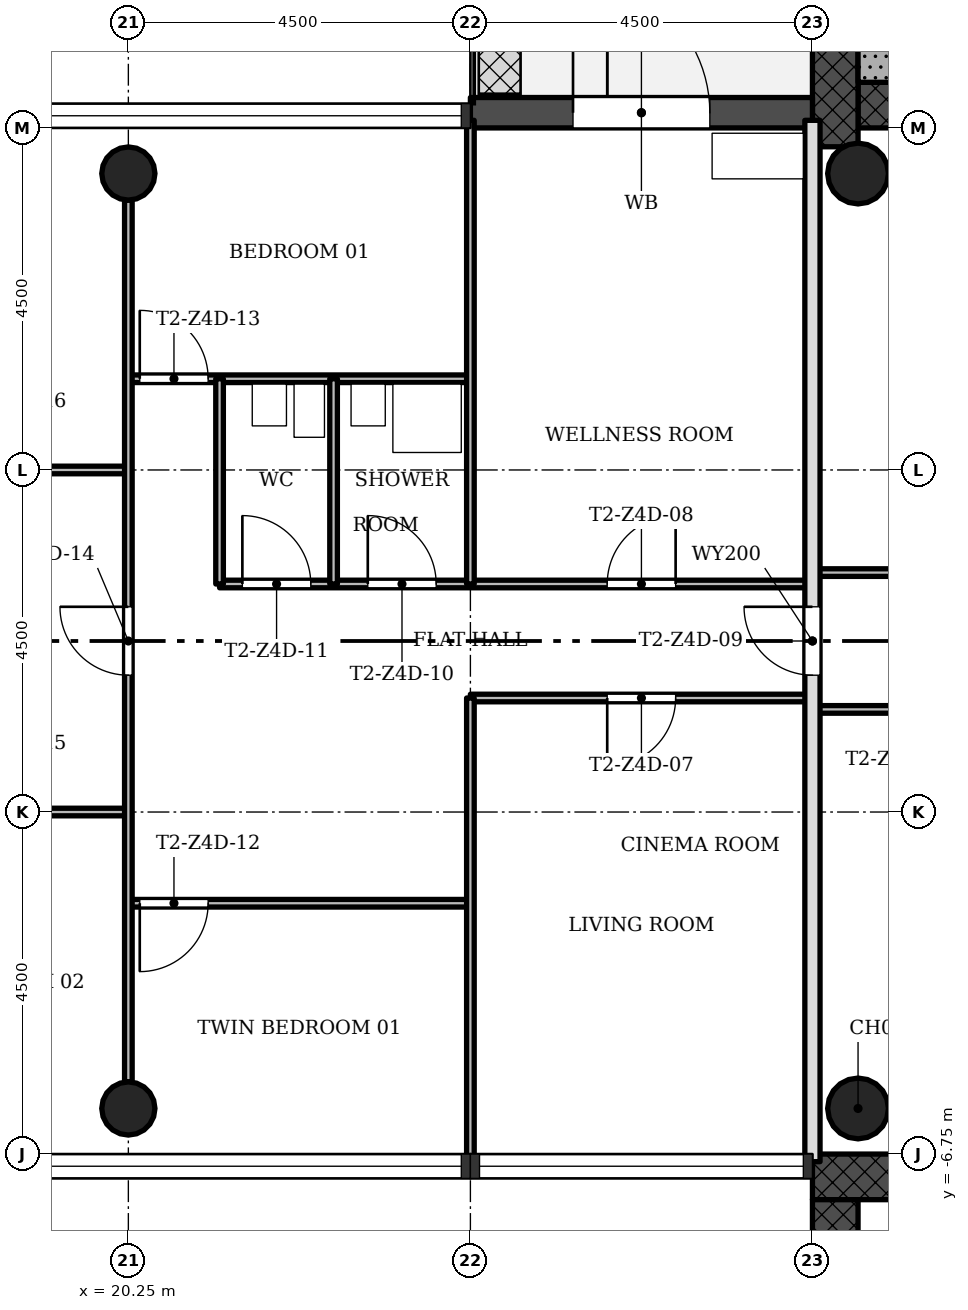
"""IFC4 building model, lengths in metres.
Left out: names, types, materials, properties, quantities, classifications, styles, units other than length and angle.
Written with IfcOpenShell. Run it as: python <this file> out.ifc"""

import sys

from ifc_helpers import new_model, si_unit, direction, frame, frame_2d, origin, origin_2d, place, context, subcontext, project, spatial, rectangle, hollow_circle, extrude, element, fill, save


model = new_model("IFC4")
c1 = context("Model", 3, precision=1e-05, world=origin(), true_north=direction((0.0, 1.0)))
c2 = subcontext(c1, "Body", "Model", "MODEL_VIEW")
j1 = project(units=[si_unit("LENGTHUNIT", "METRE"), si_unit("PLANEANGLEUNIT", "RADIAN")], contexts=[c1])
p1 = place(None, origin())
s1 = spatial("IfcSite", under=j1, at=p1, CompositionType="ELEMENT")
p2 = place(p1, origin())
s2 = spatial("IfcBuilding", under=s1, at=p2, CompositionType="ELEMENT")
p3 = place(p2, frame((0.0, 0.0, 199.4)))
s3 = spatial("IfcBuildingStorey", under=s2, at=p3, CompositionType="ELEMENT", Elevation=199.4)
p4 = place(p3, frame((29.85, 7.05, 0.0), z_axis=(0.0, 0.0, 1.0), x_axis=(1.0, 0.0, 0.0)))
e1 = element("IfcWall", 1, at=p4, inside=s3, PredefinedType="SHEAR", context=c2, shape_type="SweptSolid", body=[
    extrude(rectangle(XDim=12.9, YDim=0.6, at=frame_2d((6.45, 0.0))), origin(), (0.0, 0.0, 1.0), 3.4),
])
p5 = place(p4, frame((5.25, 0.0, 0.0)))
e2 = element("IfcOpeningElement", 2, at=p5, cuts=e1, PredefinedType="OPENING", context=c2, shape_type="SweptSolid", body=[
    extrude(rectangle(XDim=1.8, YDim=2.1, at=frame_2d((0.9, 1.05))), frame((0.0, 0.31, 0.0), z_axis=(0.0, -1.0, 0.0), x_axis=(1.0, 0.0, 0.0)), (0.0, 0.0, 1.0), 0.62),
])
p6 = place(p3, frame((29.55, 15.15, 0.0), z_axis=(0.0, 0.0, 1.0), x_axis=(0.0, -1.0, 0.0)))
e3 = element("IfcWall", 3, at=p6, inside=s3, PredefinedType="SHEAR", context=c2, shape_type="SweptSolid", body=[
    extrude(rectangle(XDim=8.648, YDim=0.6, at=frame_2d((4.324, 0.0))), origin(), (0.0, 0.0, 1.0), 3.4),
])
p7 = place(p3, frame((42.15, -7.05, 0.0), z_axis=(0.0, 0.0, 1.0), x_axis=(-1.0, 0.0, 0.0)))
e4 = element("IfcWall", 4, at=p7, inside=s3, PredefinedType="SHEAR", context=c2, shape_type="SweptSolid", body=[
    extrude(rectangle(XDim=12.9, YDim=0.6, at=frame_2d((6.45, 0.0))), origin(), (0.0, 0.0, 1.0), 3.4),
])
p8 = place(p7, frame((5.25, 0.0, 0.0)))
e5 = element("IfcOpeningElement", 5, at=p8, cuts=e4, PredefinedType="OPENING", context=c2, shape_type="SweptSolid", body=[
    extrude(rectangle(XDim=1.8, YDim=2.1, at=frame_2d((0.9, 1.05))), frame((0.0, 0.31, 0.0), z_axis=(0.0, -1.0, 0.0), x_axis=(1.0, 0.0, 0.0)), (0.0, 0.0, 1.0), 0.62),
])
p9 = place(p3, frame((29.55, -7.35, 0.0), z_axis=(0.0, 0.0, 1.0), x_axis=(0.0, -1.0, 0.0)))
e6 = element("IfcWall", 6, at=p9, inside=s3, PredefinedType="SHEAR", context=c2, shape_type="SweptSolid", body=[
    extrude(rectangle(XDim=8.4, YDim=0.6, at=frame_2d((4.2, 0.0))), origin(), (0.0, 0.0, 1.0), 3.4),
])
for number, where, z_axis, x_axis in (
    (7, (20.25, 6.15, 0.0), (0.0, 0.0, 1.0), (1.0, 0.0, 0.0)),
    (8, (20.25, -6.15, 0.0), (0.0, 0.0, 1.0), (1.0, 0.0, 0.0)),
):
    element("IfcColumn", number, at=place(p3, frame(where, z_axis=z_axis, x_axis=x_axis)), inside=s3, PredefinedType="COLUMN", context=c2, shape_type="SweptSolid", body=[
        extrude(hollow_circle(Radius=0.35, WallThickness=0.025, at=origin_2d()), origin(), (0.0, 0.0, 1.0), 3.4),
    ])
for number, where, z_axis, x_axis in (
    (9, (29.85, 6.15, 0.0), (0.0, 0.0, 1.0), (1.0, 0.0, 0.0)),
    (10, (29.85, -6.15, 0.0), (0.0, 0.0, 1.0), (1.0, 0.0, 0.0)),
):
    element("IfcColumn", number, at=place(p3, frame(where, z_axis=z_axis, x_axis=x_axis)), inside=s3, PredefinedType="COLUMN", context=c2, shape_type="SweptSolid", body=[
        extrude(hollow_circle(Radius=0.4, WallThickness=0.028, at=origin_2d()), origin(), (0.0, 0.0, 1.0), 3.4),
    ])
p10 = place(p3, frame((29.25, 6.95, -0.02), z_axis=(0.0, 0.0, 1.0), x_axis=(-1.0, 0.0, 0.0)))
e11 = element("IfcWall", 11, at=p10, inside=s3, PredefinedType="STANDARD", context=c2, shape_type="SweptSolid", body=[
    extrude(rectangle(XDim=4.5, YDim=0.4, at=frame_2d((2.25, 0.0))), origin(), (0.0, 0.0, 1.0), 3.12),
])
p11 = place(p10, frame((1.35, 0.0, 0.02)))
e12 = element("IfcOpeningElement", 12, at=p11, cuts=e11, PredefinedType="OPENING", context=c2, shape_type="SweptSolid", body=[
    extrude(rectangle(XDim=1.8, YDim=2.1, at=frame_2d((0.9, 1.05))), frame((0.0, 0.21, 0.0), z_axis=(0.0, -1.0, 0.0), x_axis=(1.0, 0.0, 0.0)), (0.0, 0.0, 1.0), 0.42),
])
p12 = place(p3, frame((24.75, -3.45, 0.0), z_axis=(0.0, 0.0, 1.0), x_axis=(-1.0, 0.0, 0.0)))
e13 = element("IfcWall", 13, at=p12, inside=s3, PredefinedType="PARTITIONING", context=c2, shape_type="SweptSolid", body=[
    extrude(rectangle(XDim=4.5, YDim=0.1, at=frame_2d((2.25, 0.0))), origin(), (0.0, 0.0, 1.0), 3.0),
])
p13 = place(p12, frame((3.45, 0.0, 0.0)))
e14 = element("IfcOpeningElement", 14, at=p13, cuts=e13, PredefinedType="OPENING", context=c2, shape_type="SweptSolid", body=[
    extrude(rectangle(XDim=0.9, YDim=2.1, at=frame_2d((0.45, 1.05))), frame((0.0, 0.06, 0.0), z_axis=(0.0, -1.0, 0.0), x_axis=(1.0, 0.0, 0.0)), (0.0, 0.0, 1.0), 0.12),
])
p14 = place(p3, frame((20.25, -2.25, 0.0), z_axis=(0.0, 0.0, 1.0), x_axis=(-1.0, 0.0, 0.0)))
e15 = element("IfcWall", 15, at=p14, inside=s3, PredefinedType="PARTITIONING", context=c2, shape_type="SweptSolid", body=[
    extrude(rectangle(XDim=4.6, YDim=0.1, at=frame_2d((2.3, 0.0))), origin(), (0.0, 0.0, 1.0), 3.0),
])
p15 = place(p14, frame((1.05, 0.0, 0.0)))
e16 = element("IfcOpeningElement", 16, at=p15, cuts=e15, PredefinedType="OPENING", context=c2, shape_type="SweptSolid", body=[
    extrude(rectangle(XDim=0.9, YDim=2.1, at=frame_2d((0.45, 1.05))), frame((0.0, 0.06, 0.0), z_axis=(0.0, -1.0, 0.0), x_axis=(1.0, 0.0, 0.0)), (0.0, 0.0, 1.0), 0.12),
])
p16 = place(p3, frame((31.5, -0.9, 0.0), z_axis=(0.0, 0.0, 1.0), x_axis=(-1.0, 0.0, 0.0)))
e17 = element("IfcWall", 17, at=p16, inside=s3, PredefinedType="PARTITIONING", context=c2, shape_type="SweptSolid", body=[
    extrude(rectangle(XDim=2.25, YDim=0.1, at=frame_2d((1.125, 0.0))), origin(), (0.0, 0.0, 1.0), 3.0),
])
p17 = place(p3, frame((29.25, -0.75, 0.0), z_axis=(0.0, 0.0, 1.0), x_axis=(-1.0, 0.0, 0.0)))
e18 = element("IfcWall", 18, at=p17, inside=s3, PredefinedType="PARTITIONING", context=c2, shape_type="SweptSolid", body=[
    extrude(rectangle(XDim=4.5, YDim=0.1, at=frame_2d((2.25, 0.0))), origin(), (0.0, 0.0, 1.0), 3.0),
])
p18 = place(p17, frame((1.8, 0.0, 0.0)))
e19 = element("IfcOpeningElement", 19, at=p18, cuts=e18, PredefinedType="OPENING", context=c2, shape_type="SweptSolid", body=[
    extrude(rectangle(XDim=0.9, YDim=2.1, at=frame_2d((0.45, 1.05))), frame((0.0, 0.06, 0.0), z_axis=(0.0, -1.0, 0.0), x_axis=(1.0, 0.0, 0.0)), (0.0, 0.0, 1.0), 0.12),
])
p19 = place(p3, frame((29.25, 0.75, 0.0), z_axis=(0.0, 0.0, 1.0), x_axis=(-1.0, 0.0, 0.0)))
e20 = element("IfcWall", 20, at=p19, inside=s3, PredefinedType="PARTITIONING", context=c2, shape_type="SweptSolid", body=[
    extrude(rectangle(XDim=7.8, YDim=0.1, at=frame_2d((3.9, 0.0))), origin(), (0.0, 0.0, 1.0), 3.0),
])
p20 = place(p19, frame((1.8, 0.0, 0.0)))
e21 = element("IfcOpeningElement", 21, at=p20, cuts=e20, PredefinedType="OPENING", context=c2, shape_type="SweptSolid", body=[
    extrude(rectangle(XDim=0.9, YDim=2.1, at=frame_2d((0.45, 1.05))), frame((0.0, 0.06, 0.0), z_axis=(0.0, -1.0, 0.0), x_axis=(1.0, 0.0, 0.0)), (0.0, 0.0, 1.0), 0.12),
])
p21 = place(p19, frame((4.95, 0.0, 0.0)))
e22 = element("IfcOpeningElement", 22, at=p21, cuts=e20, PredefinedType="OPENING", context=c2, shape_type="SweptSolid", body=[
    extrude(rectangle(XDim=0.9, YDim=2.1, at=frame_2d((0.45, 1.05))), frame((0.0, 0.06, 0.0), z_axis=(0.0, -1.0, 0.0), x_axis=(1.0, 0.0, 0.0)), (0.0, 0.0, 1.0), 0.12),
])
p22 = place(p19, frame((6.6, 0.0, 0.0)))
e23 = element("IfcOpeningElement", 23, at=p22, cuts=e20, PredefinedType="OPENING", context=c2, shape_type="SweptSolid", body=[
    extrude(rectangle(XDim=0.9, YDim=2.1, at=frame_2d((0.45, 1.05))), frame((0.0, 0.06, 0.0), z_axis=(0.0, -1.0, 0.0), x_axis=(1.0, 0.0, 0.0)), (0.0, 0.0, 1.0), 0.12),
])
p23 = place(p3, frame((31.5, 0.9, 0.0), z_axis=(0.0, 0.0, 1.0), x_axis=(-1.0, 0.0, 0.0)))
e24 = element("IfcWall", 24, at=p23, inside=s3, PredefinedType="PARTITIONING", context=c2, shape_type="SweptSolid", body=[
    extrude(rectangle(XDim=2.25, YDim=0.1, at=frame_2d((1.125, 0.0))), origin(), (0.0, 0.0, 1.0), 3.0),
])
p24 = place(p3, frame((20.25, 2.25, 0.0), z_axis=(0.0, 0.0, 1.0), x_axis=(-1.0, 0.0, 0.0)))
e25 = element("IfcWall", 25, at=p24, inside=s3, PredefinedType="PARTITIONING", context=c2, shape_type="SweptSolid", body=[
    extrude(rectangle(XDim=4.6, YDim=0.1, at=frame_2d((2.3, 0.0))), origin(), (0.0, 0.0, 1.0), 3.0),
])
p25 = place(p24, frame((1.05, 0.0, 0.0)))
e26 = element("IfcOpeningElement", 26, at=p25, cuts=e25, PredefinedType="OPENING", context=c2, shape_type="SweptSolid", body=[
    extrude(rectangle(XDim=0.9, YDim=2.1, at=frame_2d((0.45, 1.05))), frame((0.0, 0.06, 0.0), z_axis=(0.0, -1.0, 0.0), x_axis=(1.0, 0.0, 0.0)), (0.0, 0.0, 1.0), 0.12),
])
p26 = place(p3, frame((24.75, 3.45, 0.0), z_axis=(0.0, 0.0, 1.0), x_axis=(-1.0, 0.0, 0.0)))
e27 = element("IfcWall", 27, at=p26, inside=s3, PredefinedType="PARTITIONING", context=c2, shape_type="SweptSolid", body=[
    extrude(rectangle(XDim=4.5, YDim=0.1, at=frame_2d((2.25, 0.0))), origin(), (0.0, 0.0, 1.0), 3.0),
])
p27 = place(p26, frame((3.45, 0.0, 0.0)))
e28 = element("IfcOpeningElement", 28, at=p27, cuts=e27, PredefinedType="OPENING", context=c2, shape_type="SweptSolid", body=[
    extrude(rectangle(XDim=0.9, YDim=2.1, at=frame_2d((0.45, 1.05))), frame((0.0, 0.06, 0.0), z_axis=(0.0, -1.0, 0.0), x_axis=(1.0, 0.0, 0.0)), (0.0, 0.0, 1.0), 0.12),
])
p28 = place(p3, frame((29.25, -6.85, 0.0), z_axis=(0.0, 0.0, 1.0), x_axis=(0.0, 1.0, 0.0)))
e29 = element("IfcWall", 29, at=p28, inside=s3, PredefinedType="SOLIDWALL", context=c2, shape_type="SweptSolid", body=[
    extrude(rectangle(XDim=13.7, YDim=0.2, at=frame_2d((6.85, 0.0))), origin(), (0.0, 0.0, 1.0), 3.0),
])
p29 = place(p28, frame((6.4, 0.0, 0.0)))
e30 = element("IfcOpeningElement", 30, at=p29, cuts=e29, PredefinedType="OPENING", context=c2, shape_type="SweptSolid", body=[
    extrude(rectangle(XDim=0.9, YDim=2.1, at=frame_2d((0.45, 1.05))), frame((0.0, 0.11, 0.0), z_axis=(0.0, -1.0, 0.0), x_axis=(1.0, 0.0, 0.0)), (0.0, 0.0, 1.0), 0.22),
])
for number, where, z_axis, x_axis in (
    (31, (24.75, -6.85, 0.0), (0.0, 0.0, 1.0), (0.0, 1.0, 0.0)),
    (32, (24.75, 0.75, 0.0), (0.0, 0.0, 1.0), (0.0, 1.0, 0.0)),
):
    element("IfcWall", number, at=place(p3, frame(where, z_axis=z_axis, x_axis=x_axis)), inside=s3, PredefinedType="PARTITIONING", context=c2, shape_type="SweptSolid", body=[
        extrude(rectangle(XDim=6.1, YDim=0.1, at=frame_2d((3.05, 0.0))), origin(), (0.0, 0.0, 1.0), 3.0),
    ])
for number, where, z_axis, x_axis in (
    (33, (22.95, 0.75, 0.0), (0.0, 0.0, 1.0), (0.0, 1.0, 0.0)),
    (34, (21.45, 0.75, 0.0), (0.0, 0.0, 1.0), (0.0, 1.0, 0.0)),
):
    element("IfcWall", number, at=place(p3, frame(where, z_axis=z_axis, x_axis=x_axis)), inside=s3, PredefinedType="PARTITIONING", context=c2, shape_type="SweptSolid", body=[
        extrude(rectangle(XDim=2.7, YDim=0.1, at=frame_2d((1.35, 0.0))), origin(), (0.0, 0.0, 1.0), 3.0),
    ])
p30 = place(p3, frame((20.25, -5.8, 0.0), z_axis=(0.0, 0.0, 1.0), x_axis=(0.0, 1.0, 0.0)))
e35 = element("IfcWall", 35, at=p30, inside=s3, PredefinedType="PARTITIONING", context=c2, shape_type="SweptSolid", body=[
    extrude(rectangle(XDim=11.6, YDim=0.1, at=frame_2d((5.8, 0.0))), origin(), (0.0, 0.0, 1.0), 3.0),
])
p31 = place(p30, frame((5.35, 0.0, 0.0)))
e36 = element("IfcOpeningElement", 36, at=p31, cuts=e35, PredefinedType="OPENING", context=c2, shape_type="SweptSolid", body=[
    extrude(rectangle(XDim=0.9, YDim=2.1, at=frame_2d((0.45, 1.05))), frame((0.0, 0.06, 0.0), z_axis=(0.0, -1.0, 0.0), x_axis=(1.0, 0.0, 0.0)), (0.0, 0.0, 1.0), 0.12),
])
p32 = place(p3, frame((34.15, 7.65, 0.0), z_axis=(0.0, 0.0, 1.0), x_axis=(-1.0, 0.0, 0.0)))
e37 = element("IfcWall", 37, at=p32, inside=s3, PredefinedType="SHEAR", context=c2, shape_type="SweptSolid", body=[
    extrude(rectangle(XDim=4.3, YDim=0.6, at=frame_2d((2.15, 0.0))), origin(), (0.0, 0.0, 1.0), 3.4),
])
p33 = place(p11, origin())
e38 = element("IfcDoor", 38, at=p33, inside=s3, OperationType="SINGLE_SWING_RIGHT", PredefinedType="DOOR", context=c2, shape_type="SweptSolid", body=[
    extrude(rectangle(XDim=1.8, YDim=2.1, at=frame_2d((0.9, 1.05))), frame((0.0, 0.025, 0.0), z_axis=(0.0, -1.0, 0.0), x_axis=(1.0, 0.0, 0.0)), (0.0, 0.0, 1.0), 0.05),
])
fill(e12, e38)
p34 = place(p18, origin())
e39 = element("IfcDoor", 39, at=p34, inside=s3, OperationType="SINGLE_SWING_LEFT", PredefinedType="DOOR", context=c2, shape_type="SweptSolid", body=[
    extrude(rectangle(XDim=0.9, YDim=2.1, at=frame_2d((0.45, 1.05))), frame((0.0, 0.025, 0.0), z_axis=(0.0, -1.0, 0.0), x_axis=(1.0, 0.0, 0.0)), (0.0, 0.0, 1.0), 0.05),
])
fill(e19, e39)
p35 = place(p20, origin())
e40 = element("IfcDoor", 40, at=p35, inside=s3, OperationType="SINGLE_SWING_LEFT", PredefinedType="DOOR", context=c2, shape_type="SweptSolid", body=[
    extrude(rectangle(XDim=0.9, YDim=2.1, at=frame_2d((0.45, 1.05))), frame((0.0, 0.025, 0.0), z_axis=(0.0, -1.0, 0.0), x_axis=(1.0, 0.0, 0.0)), (0.0, 0.0, 1.0), 0.05),
])
fill(e21, e40)
p36 = place(p29, origin())
e41 = element("IfcDoor", 41, at=p36, inside=s3, OperationType="SINGLE_SWING_LEFT", PredefinedType="DOOR", context=c2, shape_type="SweptSolid", body=[
    extrude(rectangle(XDim=0.9, YDim=2.1, at=frame_2d((0.45, 1.05))), frame((0.0, 0.025, 0.0), z_axis=(0.0, -1.0, 0.0), x_axis=(1.0, 0.0, 0.0)), (0.0, 0.0, 1.0), 0.05),
])
fill(e30, e41)
p37 = place(p21, origin())
e42 = element("IfcDoor", 42, at=p37, inside=s3, OperationType="SINGLE_SWING_RIGHT", PredefinedType="DOOR", context=c2, shape_type="SweptSolid", body=[
    extrude(rectangle(XDim=0.9, YDim=2.1, at=frame_2d((0.45, 1.05))), frame((0.0, 0.025, 0.0), z_axis=(0.0, -1.0, 0.0), x_axis=(1.0, 0.0, 0.0)), (0.0, 0.0, 1.0), 0.05),
])
fill(e22, e42)
p38 = place(p22, origin())
e43 = element("IfcDoor", 43, at=p38, inside=s3, OperationType="SINGLE_SWING_RIGHT", PredefinedType="DOOR", context=c2, shape_type="SweptSolid", body=[
    extrude(rectangle(XDim=0.9, YDim=2.1, at=frame_2d((0.45, 1.05))), frame((0.0, 0.025, 0.0), z_axis=(0.0, -1.0, 0.0), x_axis=(1.0, 0.0, 0.0)), (0.0, 0.0, 1.0), 0.05),
])
fill(e23, e43)
p39 = place(p13, origin())
e44 = element("IfcDoor", 44, at=p39, inside=s3, OperationType="SINGLE_SWING_LEFT", PredefinedType="DOOR", context=c2, shape_type="SweptSolid", body=[
    extrude(rectangle(XDim=0.9, YDim=2.1, at=frame_2d((0.45, 1.05))), frame((0.0, 0.025, 0.0), z_axis=(0.0, -1.0, 0.0), x_axis=(1.0, 0.0, 0.0)), (0.0, 0.0, 1.0), 0.05),
])
fill(e14, e44)
p40 = place(p27, origin())
e45 = element("IfcDoor", 45, at=p40, inside=s3, OperationType="SINGLE_SWING_RIGHT", PredefinedType="DOOR", context=c2, shape_type="SweptSolid", body=[
    extrude(rectangle(XDim=0.9, YDim=2.1, at=frame_2d((0.45, 1.05))), frame((0.0, 0.025, 0.0), z_axis=(0.0, -1.0, 0.0), x_axis=(1.0, 0.0, 0.0)), (0.0, 0.0, 1.0), 0.05),
])
fill(e28, e45)
p41 = place(p31, origin())
e46 = element("IfcDoor", 46, at=p41, inside=s3, OperationType="SINGLE_SWING_LEFT", PredefinedType="DOOR", context=c2, shape_type="SweptSolid", body=[
    extrude(rectangle(XDim=0.9, YDim=2.1, at=frame_2d((0.45, 1.05))), frame((0.0, 0.025, 0.0), z_axis=(0.0, -1.0, 0.0), x_axis=(1.0, 0.0, 0.0)), (0.0, 0.0, 1.0), 0.05),
])
fill(e36, e46)
save(model, sys.argv[1])
